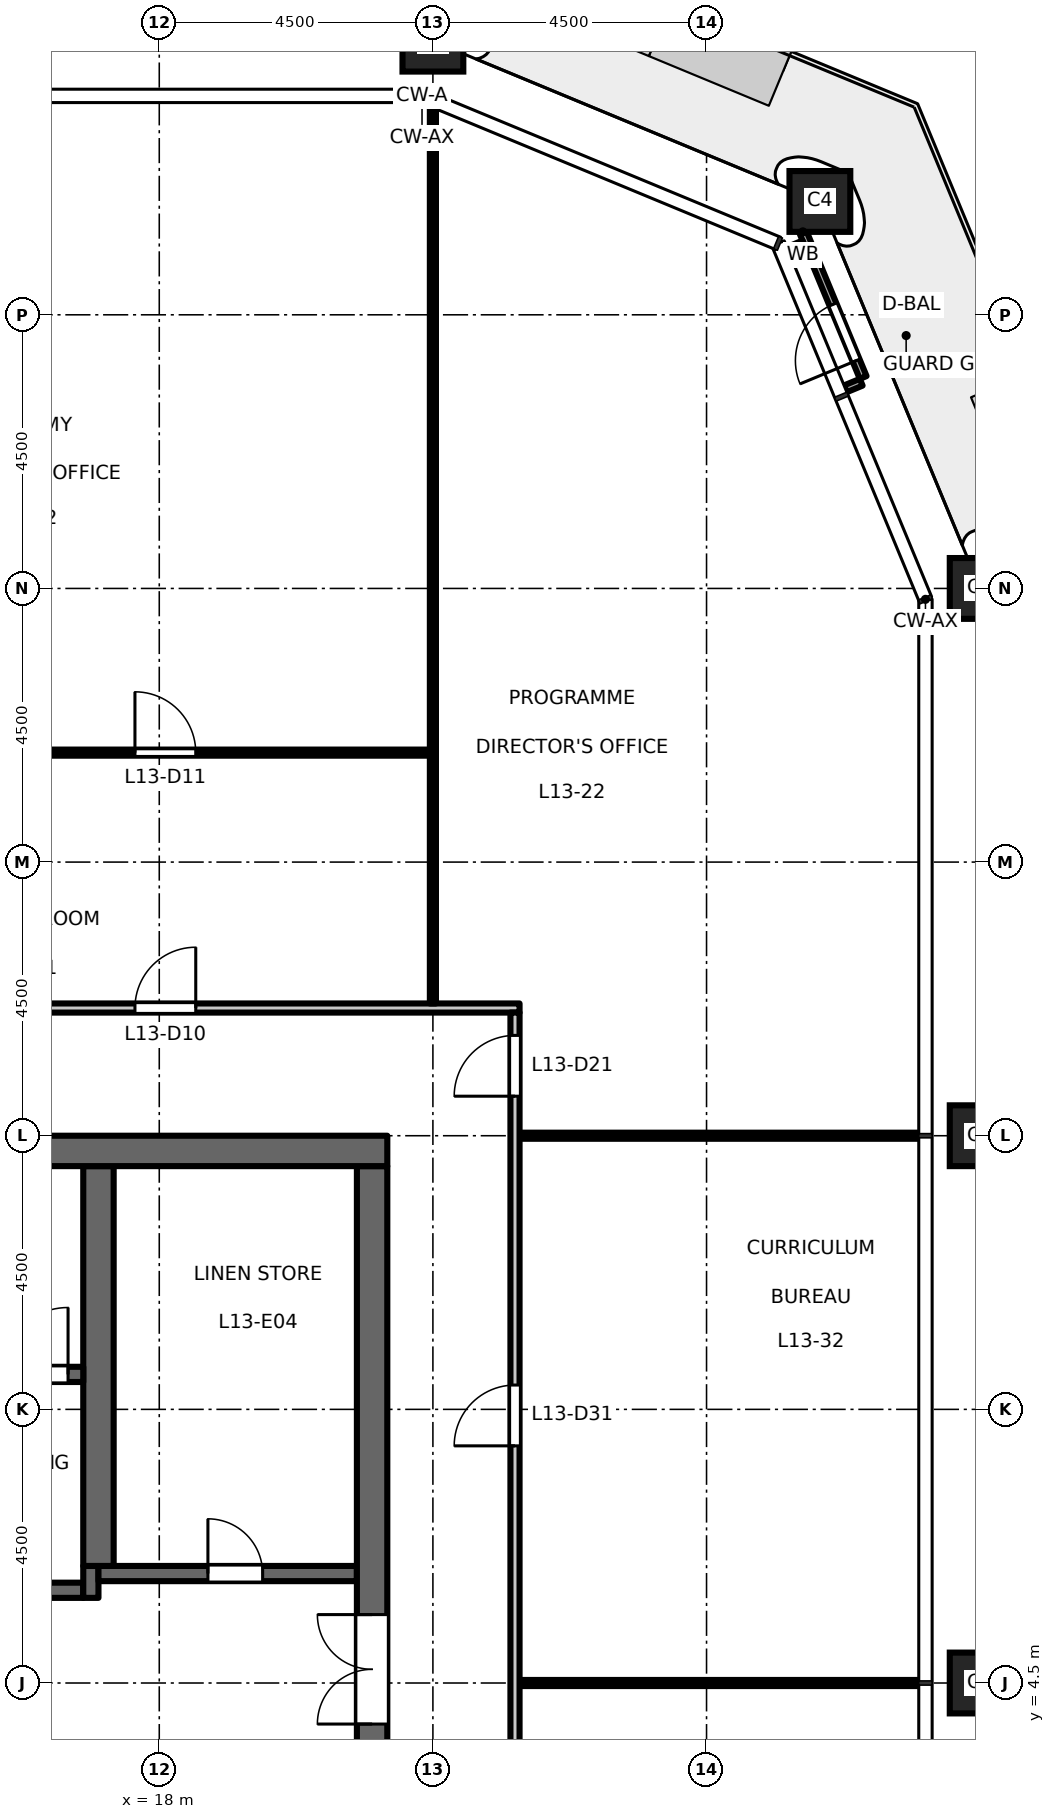
"""IFC4 building model, lengths in metres.
Left out: names, types, materials, properties, quantities, classifications, styles, units other than length and angle.
Written with IfcOpenShell. Run it as: python <this file> out.ifc"""

import sys

from ifc_helpers import new_model, si_unit, direction, frame, frame_2d, origin, origin_2d, place, context, subcontext, project, spatial, rectangle, hollow_rectangle, extrude, element, fill, save


model = new_model("IFC4")
c1 = context("Model", 3, precision=1e-05, world=origin(), true_north=direction((0.0, 1.0)))
c2 = subcontext(c1, "Body", "Model", "MODEL_VIEW")
j1 = project(units=[si_unit("LENGTHUNIT", "METRE"), si_unit("PLANEANGLEUNIT", "RADIAN")], contexts=[c1])
p1 = place(None, origin())
s1 = spatial("IfcSite", under=j1, at=p1, CompositionType="ELEMENT")
p2 = place(p1, origin())
s2 = spatial("IfcBuilding", under=s1, at=p2, CompositionType="ELEMENT")
p3 = place(p2, frame((0.0, 0.0, 62.7)))
s3 = spatial("IfcBuildingStorey", under=s2, at=p3, CompositionType="ELEMENT", Elevation=62.7)
for number, where, z_axis, x_axis in (
    (1, (31.5, 4.5, 0.0), (0.0, 0.0, 1.0), (1.0, 0.0, 0.0)),
    (2, (31.5, 13.5, 0.0), (0.0, 0.0, 1.0), (1.0, 0.0, 0.0)),
    (3, (31.5, 22.5, 0.0), (0.0, 0.0, 1.0), (1.0, 0.0, 0.0)),
    (4, (28.864, 28.864, 0.0), (0.0, 0.0, 1.0), (1.0, 0.0, 0.0)),
    (5, (22.5, 31.5, 0.0), (0.0, 0.0, 1.0), (1.0, 0.0, 0.0)),
):
    element("IfcColumn", number, at=place(p3, frame(where, z_axis=z_axis, x_axis=x_axis)), inside=s3, PredefinedType="COLUMN", context=c2, shape_type="SweptSolid", body=[
        extrude(hollow_rectangle(XDim=1.0, YDim=1.0, WallThickness=0.06, at=origin_2d()), origin(), (0.0, 0.0, 1.0), 4.5),
    ])
p4 = place(p3, frame((12.15, 6.025, 0.0), z_axis=(0.0, 0.0, 1.0), x_axis=(1.0, 0.0, 0.0)))
e6 = element("IfcWall", 6, at=p4, inside=s3, PredefinedType="SHEAR", context=c2, shape_type="SweptSolid", body=[
    extrude(rectangle(XDim=4.6, YDim=0.25, at=frame_2d((2.3, 0.0))), origin(), (0.0, 0.0, 1.0), 4.35),
])
p5 = place(p4, frame((1.8, 0.0, 0.0)))
e7 = element("IfcOpeningElement", 7, at=p5, cuts=e6, PredefinedType="OPENING", context=c2, shape_type="SweptSolid", body=[
    extrude(rectangle(XDim=1.0, YDim=2.1, at=frame_2d((0.5, 1.05))), frame((0.0, 0.135, 0.0), z_axis=(0.0, -1.0, 0.0), x_axis=(1.0, 0.0, 0.0)), (0.0, 0.0, 1.0), 0.27),
])
p6 = place(p3, frame((16.875, 5.9, 0.0), z_axis=(0.0, 0.0, 1.0), x_axis=(0.0, 1.0, 0.0)))
e8 = element("IfcWall", 8, at=p6, inside=s3, PredefinedType="SHEAR", context=c2, shape_type="SweptSolid", body=[
    extrude(rectangle(XDim=0.525, YDim=0.25, at=frame_2d((0.263, 0.0))), origin(), (0.0, 0.0, 1.0), 4.35),
])
p7 = place(p3, frame((17.0, 6.3, 0.0), z_axis=(0.0, 0.0, 1.0), x_axis=(1.0, 0.0, 0.0)))
e9 = element("IfcWall", 9, at=p7, inside=s3, PredefinedType="SHEAR", context=c2, shape_type="SweptSolid", body=[
    extrude(rectangle(XDim=4.25, YDim=0.25, at=frame_2d((2.125, 0.0))), origin(), (0.0, 0.0, 1.0), 4.35),
])
p8 = place(p7, frame((1.8, 0.0, 0.0)))
e10 = element("IfcOpeningElement", 10, at=p8, cuts=e9, PredefinedType="OPENING", context=c2, shape_type="SweptSolid", body=[
    extrude(rectangle(XDim=0.9, YDim=2.1, at=frame_2d((0.45, 1.05))), frame((0.0, 0.135, 0.0), z_axis=(0.0, -1.0, 0.0), x_axis=(1.0, 0.0, 0.0)), (0.0, 0.0, 1.0), 0.27),
])
p9 = place(p3, frame((21.5, -13.0, 0.0), z_axis=(0.0, 0.0, 1.0), x_axis=(0.0, 1.0, 0.0)))
e11 = element("IfcWall", 11, at=p9, inside=s3, PredefinedType="SHEAR", context=c2, shape_type="SweptSolid", body=[
    extrude(rectangle(XDim=26.0, YDim=0.5, at=frame_2d((13.0, 0.0))), origin(), (0.0, 0.0, 1.0), 4.35),
])
p10 = place(p9, frame((16.825, 0.0, 0.0)))
e12 = element("IfcOpeningElement", 12, at=p10, cuts=e11, PredefinedType="OPENING", context=c2, shape_type="SweptSolid", body=[
    extrude(rectangle(XDim=1.8, YDim=2.1, at=frame_2d((0.9, 1.05))), frame((0.0, 0.26, 0.0), z_axis=(0.0, -1.0, 0.0), x_axis=(1.0, 0.0, 0.0)), (0.0, 0.0, 1.0), 0.52),
])
p11 = place(p9, frame((7.375, 0.0, 0.0)))
e13 = element("IfcOpeningElement", 13, at=p11, cuts=e11, PredefinedType="OPENING", context=c2, shape_type="SweptSolid", body=[
    extrude(rectangle(XDim=1.8, YDim=2.1, at=frame_2d((0.9, 1.05))), frame((0.0, 0.26, 0.0), z_axis=(0.0, -1.0, 0.0), x_axis=(1.0, 0.0, 0.0)), (0.0, 0.0, 1.0), 0.52),
])
p12 = place(p9, frame((2.65, 0.0, 0.0)))
e14 = element("IfcOpeningElement", 14, at=p12, cuts=e11, PredefinedType="OPENING", context=c2, shape_type="SweptSolid", body=[
    extrude(rectangle(XDim=0.9, YDim=2.1, at=frame_2d((0.45, 1.05))), frame((0.0, 0.26, 0.0), z_axis=(0.0, -1.0, 0.0), x_axis=(1.0, 0.0, 0.0)), (0.0, 0.0, 1.0), 0.52),
])
p13 = place(p3, frame((17.0, 6.425, 0.0), z_axis=(0.0, 0.0, 1.0), x_axis=(0.0, 1.0, 0.0)))
e15 = element("IfcWall", 15, at=p13, inside=s3, PredefinedType="SHEAR", context=c2, shape_type="SweptSolid", body=[
    extrude(rectangle(XDim=6.575, YDim=0.5, at=frame_2d((3.288, 0.0))), origin(), (0.0, 0.0, 1.0), 4.35),
])
p14 = place(p3, frame((8.75, 9.575, 0.0), z_axis=(0.0, 0.0, 1.0), x_axis=(1.0, 0.0, 0.0)))
e16 = element("IfcWall", 16, at=p14, inside=s3, PredefinedType="SHEAR", context=c2, shape_type="SweptSolid", body=[
    extrude(rectangle(XDim=8.0, YDim=0.25, at=frame_2d((4.0, 0.0))), origin(), (0.0, 0.0, 1.0), 4.35),
])
p15 = place(p14, frame((6.65, 0.0, 0.0)))
e17 = element("IfcOpeningElement", 17, at=p15, cuts=e16, PredefinedType="OPENING", context=c2, shape_type="SweptSolid", body=[
    extrude(rectangle(XDim=1.1, YDim=2.1, at=frame_2d((0.55, 1.05))), frame((0.0, 0.135, 0.0), z_axis=(0.0, -1.0, 0.0), x_axis=(1.0, 0.0, 0.0)), (0.0, 0.0, 1.0), 0.27),
])
p16 = place(p3, frame((8.25, 13.25, 0.0), z_axis=(0.0, 0.0, 1.0), x_axis=(1.0, 0.0, 0.0)))
e18 = element("IfcWall", 18, at=p16, inside=s3, PredefinedType="SHEAR", context=c2, shape_type="SweptSolid", body=[
    extrude(rectangle(XDim=13.5, YDim=0.5, at=frame_2d((6.75, 0.0))), origin(), (0.0, 0.0, 1.0), 4.35),
])
p17 = place(p3, frame((29.285, 25.783, 0.0), z_axis=(0.0, 0.0, 1.0), x_axis=(0.923772220778, 0.382942403136, 0.0)))
e19 = element("IfcWall", 19, at=p17, inside=s3, PredefinedType="STANDARD", context=c2, shape_type="SweptSolid", body=[
    extrude(rectangle(XDim=0.28, YDim=0.12, at=frame_2d((0.14, 0.0))), origin(), (0.0, 0.0, 1.0), 4.35),
])
p18 = place(p3, frame((28.343, 28.058, 0.0), z_axis=(0.0, 0.0, 1.0), x_axis=(0.923899985553, 0.382634050621, 0.0)))
e20 = element("IfcWall", 20, at=p18, inside=s3, PredefinedType="STANDARD", context=c2, shape_type="SweptSolid", body=[
    extrude(rectangle(XDim=0.28, YDim=0.12, at=frame_2d((0.14, 0.0))), origin(), (0.0, 0.0, 1.0), 4.35),
])
p19 = place(p3, frame((29.576, 25.969, 0.0), z_axis=(0.0, 0.0, 1.0), x_axis=(-0.382648460137, 0.923894017707, 0.0)))
e21 = element("IfcWall", 21, at=p19, inside=s3, PredefinedType="STANDARD", context=c2, shape_type="SweptSolid", body=[
    extrude(rectangle(XDim=2.592, YDim=0.12, at=frame_2d((1.296, 0.0))), origin(), (0.0, 0.0, 1.0), 4.35),
])
p20 = place(p19, frame((0.3, 0.0, 0.0)))
e22 = element("IfcOpeningElement", 22, at=p20, cuts=e21, PredefinedType="OPENING", context=c2, shape_type="SweptSolid", body=[
    extrude(rectangle(XDim=1.0, YDim=2.4, at=frame_2d((0.5, 1.2))), frame((0.0, 0.07, 0.0), z_axis=(0.0, -1.0, 0.0), x_axis=(1.0, 0.0, 0.0)), (0.0, 0.0, 1.0), 0.14),
])
p21 = place(p3, frame((23.925, 4.5, 0.0), z_axis=(0.0, 0.0, 1.0), x_axis=(1.0, 0.0, 0.0)))
e23 = element("IfcWall", 23, at=p21, inside=s3, PredefinedType="PARTITIONING", context=c2, shape_type="SweptSolid", body=[
    extrude(rectangle(XDim=6.585, YDim=0.1, at=frame_2d((3.292, 0.0))), origin(), (0.0, 0.0, 1.0), 4.35),
])
p22 = place(p3, frame((23.925, 13.5, 0.0), z_axis=(0.0, 0.0, 1.0), x_axis=(1.0, 0.0, 0.0)))
e24 = element("IfcWall", 24, at=p22, inside=s3, PredefinedType="PARTITIONING", context=c2, shape_type="SweptSolid", body=[
    extrude(rectangle(XDim=6.585, YDim=0.1, at=frame_2d((3.292, 0.0))), origin(), (0.0, 0.0, 1.0), 3.35),
])
p23 = place(p3, frame((-23.925, 15.6, 0.0), z_axis=(0.0, 0.0, 1.0), x_axis=(1.0, 0.0, 0.0)))
e25 = element("IfcWall", 25, at=p23, inside=s3, PredefinedType="PARTITIONING", context=c2, shape_type="SweptSolid", body=[
    extrude(rectangle(XDim=47.85, YDim=0.15, at=frame_2d((23.925, 0.0))), origin(), (0.0, 0.0, 1.0), 4.35),
])
p24 = place(p23, frame((5.525, 0.0, 0.0)))
e26 = element("IfcOpeningElement", 26, at=p24, cuts=e25, PredefinedType="OPENING", context=c2, shape_type="SweptSolid", body=[
    extrude(rectangle(XDim=1.0, YDim=2.1, at=frame_2d((0.5, 1.05))), frame((0.0, 0.085, 0.0), z_axis=(0.0, -1.0, 0.0), x_axis=(1.0, 0.0, 0.0)), (0.0, 0.0, 1.0), 0.17),
])
p25 = place(p23, frame((14.525, 0.0, 0.0)))
e27 = element("IfcOpeningElement", 27, at=p25, cuts=e25, PredefinedType="OPENING", context=c2, shape_type="SweptSolid", body=[
    extrude(rectangle(XDim=1.0, YDim=2.1, at=frame_2d((0.5, 1.05))), frame((0.0, 0.085, 0.0), z_axis=(0.0, -1.0, 0.0), x_axis=(1.0, 0.0, 0.0)), (0.0, 0.0, 1.0), 0.17),
])
p26 = place(p23, frame((23.525, 0.0, 0.0)))
e28 = element("IfcOpeningElement", 28, at=p26, cuts=e25, PredefinedType="OPENING", context=c2, shape_type="SweptSolid", body=[
    extrude(rectangle(XDim=1.0, YDim=2.1, at=frame_2d((0.5, 1.05))), frame((0.0, 0.085, 0.0), z_axis=(0.0, -1.0, 0.0), x_axis=(1.0, 0.0, 0.0)), (0.0, 0.0, 1.0), 0.17),
])
p27 = place(p23, frame((32.525, 0.0, 0.0)))
e29 = element("IfcOpeningElement", 29, at=p27, cuts=e25, PredefinedType="OPENING", context=c2, shape_type="SweptSolid", body=[
    extrude(rectangle(XDim=1.0, YDim=2.1, at=frame_2d((0.5, 1.05))), frame((0.0, 0.085, 0.0), z_axis=(0.0, -1.0, 0.0), x_axis=(1.0, 0.0, 0.0)), (0.0, 0.0, 1.0), 0.17),
])
p28 = place(p23, frame((41.525, 0.0, 0.0)))
e30 = element("IfcOpeningElement", 30, at=p28, cuts=e25, PredefinedType="OPENING", context=c2, shape_type="SweptSolid", body=[
    extrude(rectangle(XDim=1.0, YDim=2.1, at=frame_2d((0.5, 1.05))), frame((0.0, 0.085, 0.0), z_axis=(0.0, -1.0, 0.0), x_axis=(1.0, 0.0, 0.0)), (0.0, 0.0, 1.0), 0.17),
])
p29 = place(p3, frame((-4.45, 19.8, 0.0), z_axis=(0.0, 0.0, 1.0), x_axis=(1.0, 0.0, 0.0)))
e31 = element("IfcWall", 31, at=p29, inside=s3, PredefinedType="PARTITIONING", context=c2, shape_type="SweptSolid", body=[
    extrude(rectangle(XDim=26.9, YDim=0.1, at=frame_2d((13.45, 0.0))), origin(), (0.0, 0.0, 1.0), 4.35),
])
p30 = place(p29, frame((4.05, 0.0, 0.0)))
e32 = element("IfcOpeningElement", 32, at=p30, cuts=e31, PredefinedType="OPENING", context=c2, shape_type="SweptSolid", body=[
    extrude(rectangle(XDim=1.0, YDim=2.1, at=frame_2d((0.5, 1.05))), frame((0.0, 0.06, 0.0), z_axis=(0.0, -1.0, 0.0), x_axis=(1.0, 0.0, 0.0)), (0.0, 0.0, 1.0), 0.12),
])
p31 = place(p29, frame((13.05, 0.0, 0.0)))
e33 = element("IfcOpeningElement", 33, at=p31, cuts=e31, PredefinedType="OPENING", context=c2, shape_type="SweptSolid", body=[
    extrude(rectangle(XDim=1.0, YDim=2.1, at=frame_2d((0.5, 1.05))), frame((0.0, 0.06, 0.0), z_axis=(0.0, -1.0, 0.0), x_axis=(1.0, 0.0, 0.0)), (0.0, 0.0, 1.0), 0.12),
])
p32 = place(p29, frame((22.05, 0.0, 0.0)))
e34 = element("IfcOpeningElement", 34, at=p32, cuts=e31, PredefinedType="OPENING", context=c2, shape_type="SweptSolid", body=[
    extrude(rectangle(XDim=1.0, YDim=2.1, at=frame_2d((0.5, 1.05))), frame((0.0, 0.06, 0.0), z_axis=(0.0, -1.0, 0.0), x_axis=(1.0, 0.0, 0.0)), (0.0, 0.0, 1.0), 0.12),
])
p33 = place(p3, frame((22.5, 15.675, 0.0), z_axis=(0.0, 0.0, 1.0), x_axis=(0.0, 1.0, 0.0)))
e35 = element("IfcWall", 35, at=p33, inside=s3, PredefinedType="PARTITIONING", context=c2, shape_type="SweptSolid", body=[
    extrude(rectangle(XDim=14.753, YDim=0.1, at=frame_2d((7.376, 0.0))), origin(), (0.0, 0.0, 1.0), 3.35),
])
p34 = place(p3, frame((23.85, -15.525, 0.0), z_axis=(0.0, 0.0, 1.0), x_axis=(0.0, 1.0, 0.0)))
e36 = element("IfcWall", 36, at=p34, inside=s3, PredefinedType="PARTITIONING", context=c2, shape_type="SweptSolid", body=[
    extrude(rectangle(XDim=31.05, YDim=0.15, at=frame_2d((15.525, 0.0))), origin(), (0.0, 0.0, 1.0), 4.35),
])
p35 = place(p34, frame((29.675, 0.0, 0.0)))
e37 = element("IfcOpeningElement", 37, at=p35, cuts=e36, PredefinedType="OPENING", context=c2, shape_type="SweptSolid", body=[
    extrude(rectangle(XDim=1.0, YDim=2.1, at=frame_2d((0.5, 1.05))), frame((0.0, 0.085, 0.0), z_axis=(0.0, -1.0, 0.0), x_axis=(1.0, 0.0, 0.0)), (0.0, 0.0, 1.0), 0.17),
])
p36 = place(p34, frame((0.575, 0.0, 0.0)))
e38 = element("IfcOpeningElement", 38, at=p36, cuts=e36, PredefinedType="OPENING", context=c2, shape_type="SweptSolid", body=[
    extrude(rectangle(XDim=1.0, YDim=2.1, at=frame_2d((0.5, 1.05))), frame((0.0, 0.085, 0.0), z_axis=(0.0, -1.0, 0.0), x_axis=(1.0, 0.0, 0.0)), (0.0, 0.0, 1.0), 0.17),
])
p37 = place(p34, frame((5.925, 0.0, 0.0)))
e39 = element("IfcOpeningElement", 39, at=p37, cuts=e36, PredefinedType="OPENING", context=c2, shape_type="SweptSolid", body=[
    extrude(rectangle(XDim=1.0, YDim=2.1, at=frame_2d((0.5, 1.05))), frame((0.0, 0.085, 0.0), z_axis=(0.0, -1.0, 0.0), x_axis=(1.0, 0.0, 0.0)), (0.0, 0.0, 1.0), 0.17),
])
p38 = place(p34, frame((14.925, 0.0, 0.0)))
e40 = element("IfcOpeningElement", 40, at=p38, cuts=e36, PredefinedType="OPENING", context=c2, shape_type="SweptSolid", body=[
    extrude(rectangle(XDim=1.0, YDim=2.1, at=frame_2d((0.5, 1.05))), frame((0.0, 0.085, 0.0), z_axis=(0.0, -1.0, 0.0), x_axis=(1.0, 0.0, 0.0)), (0.0, 0.0, 1.0), 0.17),
])
p39 = place(p34, frame((23.925, 0.0, 0.0)))
e41 = element("IfcOpeningElement", 41, at=p39, cuts=e36, PredefinedType="OPENING", context=c2, shape_type="SweptSolid", body=[
    extrude(rectangle(XDim=1.0, YDim=2.1, at=frame_2d((0.5, 1.05))), frame((0.0, 0.085, 0.0), z_axis=(0.0, -1.0, 0.0), x_axis=(1.0, 0.0, 0.0)), (0.0, 0.0, 1.0), 0.17),
])
p40 = place(p15, origin())
e42 = element("IfcDoor", 42, at=p40, inside=s3, OperationType="SINGLE_SWING_LEFT", PredefinedType="DOOR", context=c2, shape_type="SweptSolid", body=[
    extrude(rectangle(XDim=1.1, YDim=2.1, at=frame_2d((0.55, 1.05))), frame((0.0, 0.025, 0.0), z_axis=(0.0, -1.0, 0.0), x_axis=(1.0, 0.0, 0.0)), (0.0, 0.0, 1.0), 0.05),
])
fill(e17, e42)
p41 = place(p10, origin())
e43 = element("IfcDoor", 43, at=p41, inside=s3, OperationType="DOUBLE_DOOR_DOUBLE_SWING", PredefinedType="DOOR", context=c2, shape_type="SweptSolid", body=[
    extrude(rectangle(XDim=1.8, YDim=2.1, at=frame_2d((0.9, 1.05))), frame((0.0, 0.025, 0.0), z_axis=(0.0, -1.0, 0.0), x_axis=(1.0, 0.0, 0.0)), (0.0, 0.0, 1.0), 0.05),
])
fill(e12, e43)
p42 = place(p8, origin())
e44 = element("IfcDoor", 44, at=p42, inside=s3, OperationType="SINGLE_SWING_RIGHT", PredefinedType="DOOR", context=c2, shape_type="SweptSolid", body=[
    extrude(rectangle(XDim=0.9, YDim=2.1, at=frame_2d((0.45, 1.05))), frame((0.0, 0.025, 0.0), z_axis=(0.0, -1.0, 0.0), x_axis=(1.0, 0.0, 0.0)), (0.0, 0.0, 1.0), 0.05),
])
fill(e10, e44)
p43 = place(p20, origin())
e45 = element("IfcDoor", 45, at=p43, inside=s3, OperationType="SINGLE_SWING_LEFT", PredefinedType="DOOR", context=c2, shape_type="SweptSolid", body=[
    extrude(rectangle(XDim=1.0, YDim=2.4, at=frame_2d((0.5, 1.2))), frame((0.0, 0.025, 0.0), z_axis=(0.0, -1.0, 0.0), x_axis=(1.0, 0.0, 0.0)), (0.0, 0.0, 1.0), 0.05),
])
fill(e22, e45)
p44 = place(p28, origin())
e46 = element("IfcDoor", 46, at=p44, inside=s3, OperationType="SINGLE_SWING_RIGHT", PredefinedType="DOOR", context=c2, shape_type="SweptSolid", body=[
    extrude(rectangle(XDim=1.0, YDim=2.1, at=frame_2d((0.5, 1.05))), frame((0.0, 0.025, 0.0), z_axis=(0.0, -1.0, 0.0), x_axis=(1.0, 0.0, 0.0)), (0.0, 0.0, 1.0), 0.05),
])
fill(e30, e46)
p45 = place(p32, origin())
e47 = element("IfcDoor", 47, at=p45, inside=s3, OperationType="SINGLE_SWING_LEFT", PredefinedType="DOOR", context=c2, shape_type="SweptSolid", body=[
    extrude(rectangle(XDim=1.0, YDim=2.1, at=frame_2d((0.5, 1.05))), frame((0.0, 0.025, 0.0), z_axis=(0.0, -1.0, 0.0), x_axis=(1.0, 0.0, 0.0)), (0.0, 0.0, 1.0), 0.05),
])
fill(e34, e47)
p46 = place(p35, origin())
e48 = element("IfcDoor", 48, at=p46, inside=s3, OperationType="SINGLE_SWING_LEFT", PredefinedType="DOOR", context=c2, shape_type="SweptSolid", body=[
    extrude(rectangle(XDim=1.0, YDim=2.1, at=frame_2d((0.5, 1.05))), frame((0.0, 0.025, 0.0), z_axis=(0.0, -1.0, 0.0), x_axis=(1.0, 0.0, 0.0)), (0.0, 0.0, 1.0), 0.05),
])
fill(e37, e48)
p47 = place(p39, origin())
e49 = element("IfcDoor", 49, at=p47, inside=s3, OperationType="SINGLE_SWING_LEFT", PredefinedType="DOOR", context=c2, shape_type="SweptSolid", body=[
    extrude(rectangle(XDim=1.0, YDim=2.1, at=frame_2d((0.5, 1.05))), frame((0.0, 0.025, 0.0), z_axis=(0.0, -1.0, 0.0), x_axis=(1.0, 0.0, 0.0)), (0.0, 0.0, 1.0), 0.05),
])
fill(e41, e49)
save(model, sys.argv[1])
